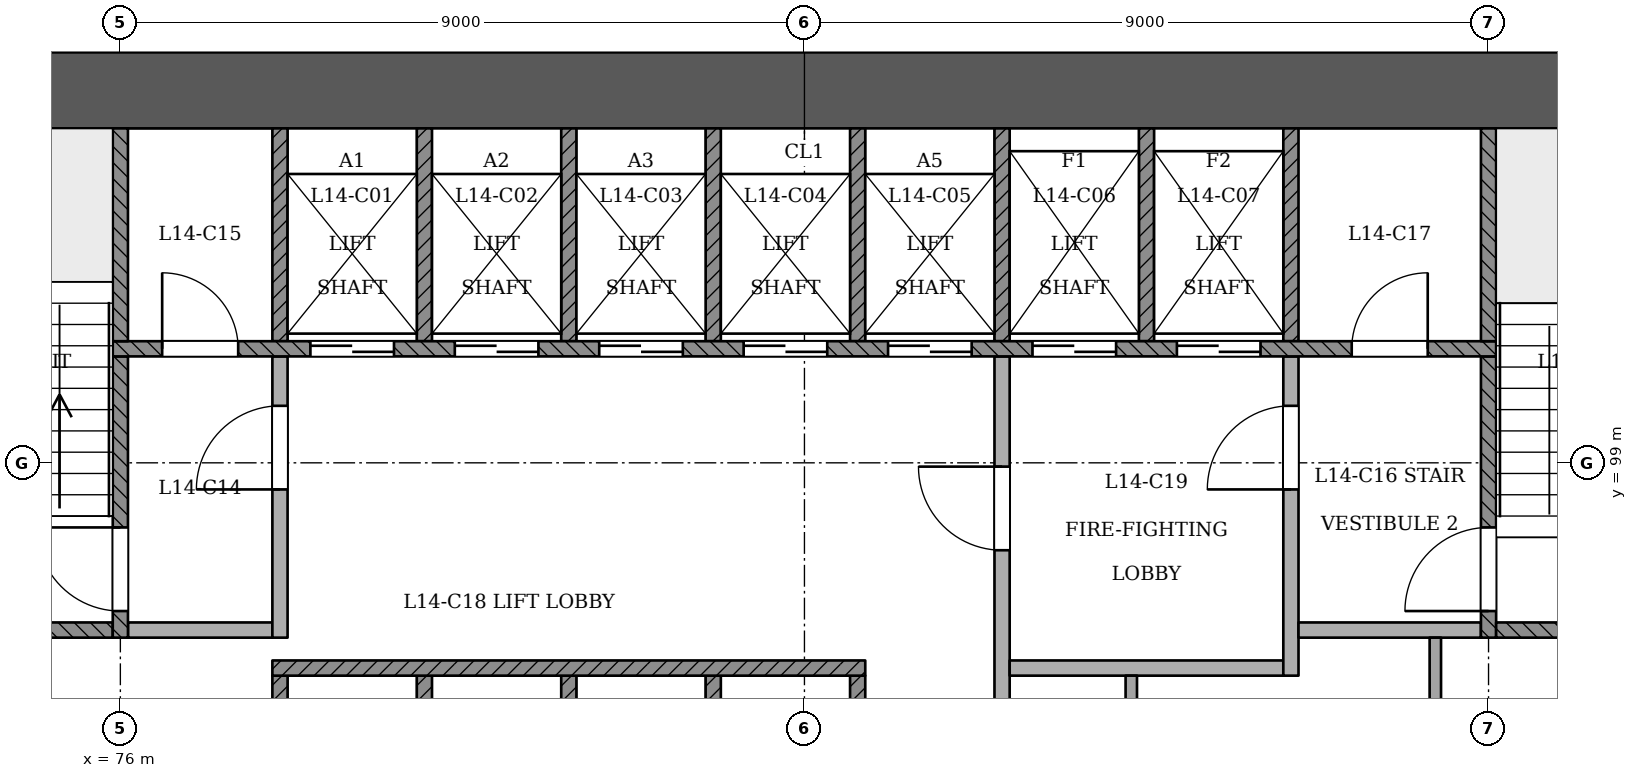
"""IFC4 building model, lengths in metres.
Left out: names, types, materials, properties, quantities, classifications, styles, units other than length and angle.
Written with IfcOpenShell. Run it as: python <this file> out.ifc"""

import sys

from ifc_helpers import new_model, si_unit, direction, frame, frame_2d, origin, place, context, subcontext, project, spatial, rectangle, extrude, element, fill, save


model = new_model("IFC4")
c1 = context("Model", 3, precision=1e-05, world=origin(), true_north=direction((0.0, 1.0)))
c2 = subcontext(c1, "Body", "Model", "MODEL_VIEW")
j1 = project(units=[si_unit("LENGTHUNIT", "METRE"), si_unit("PLANEANGLEUNIT", "RADIAN")], contexts=[c1])
p1 = place(None, origin())
s1 = spatial("IfcSite", under=j1, at=p1, CompositionType="ELEMENT")
p2 = place(p1, origin())
s2 = spatial("IfcBuilding", under=s1, at=p2, CompositionType="ELEMENT")
p3 = place(p2, frame((0.0, 0.0, 59.4)))
s3 = spatial("IfcBuildingStorey", under=s2, at=p3, CompositionType="ELEMENT", Elevation=59.4)
p4 = place(p3, frame((97.5, 103.9, 0.0), z_axis=(0.0, 0.0, 1.0), x_axis=(-1.0, 0.0, 0.0)))
e1 = element("IfcWall", 1, at=p4, inside=s3, PredefinedType="SHEAR", context=c2, shape_type="SweptSolid", body=[
    extrude(rectangle(XDim=25.5, YDim=1.0, at=frame_2d((12.75, 0.0))), origin(), (0.0, 0.0, 1.0), 3.6),
])
p5 = place(p3, frame((62.256, 96.887, 0.0), z_axis=(0.0, 0.0, 1.0), x_axis=(0.500001966348, -0.86602426851, 0.0)))
e2 = element("IfcWall", 2, at=p5, inside=s3, PredefinedType="PARTITIONING", context=c2, shape_type="SweptSolid", body=[
    extrude(rectangle(XDim=43.626, YDim=0.15, at=frame_2d((21.813, 0.0))), origin(), (0.0, 0.0, 1.0), 2.7),
])
p6 = place(p5, frame((3.556, 0.0, 0.0)))
e3 = element("IfcOpeningElement", 3, at=p6, cuts=e2, PredefinedType="OPENING", context=c2, shape_type="SweptSolid", body=[
    extrude(rectangle(XDim=1.2, YDim=2.1, at=frame_2d((0.6, 1.05))), frame((0.0, 0.085, 0.0), z_axis=(0.0, -1.0, 0.0), x_axis=(1.0, 0.0, 0.0)), (0.0, 0.0, 1.0), 0.171),
])
p7 = place(p5, frame((12.213, 0.0, 0.0)))
e4 = element("IfcOpeningElement", 4, at=p7, cuts=e2, PredefinedType="OPENING", context=c2, shape_type="SweptSolid", body=[
    extrude(rectangle(XDim=1.2, YDim=2.1, at=frame_2d((0.6, 1.05))), frame((0.0, 0.085, 0.0), z_axis=(0.0, -1.0, 0.0), x_axis=(1.0, 0.0, 0.0)), (0.0, 0.0, 1.0), 0.171),
])
p8 = place(p5, frame((19.063, 0.0, 0.0)))
e5 = element("IfcOpeningElement", 5, at=p8, cuts=e2, PredefinedType="OPENING", context=c2, shape_type="SweptSolid", body=[
    extrude(rectangle(XDim=1.0, YDim=2.1, at=frame_2d((0.5, 1.05))), frame((0.0, 0.085, 0.0), z_axis=(0.0, -1.0, 0.0), x_axis=(1.0, 0.0, 0.0)), (0.0, 0.0, 1.0), 0.171),
])
p9 = place(p5, frame((27.963, 0.0, 0.0)))
e6 = element("IfcOpeningElement", 6, at=p9, cuts=e2, PredefinedType="OPENING", context=c2, shape_type="SweptSolid", body=[
    extrude(rectangle(XDim=1.2, YDim=2.1, at=frame_2d((0.6, 1.05))), frame((0.0, 0.085, 0.0), z_axis=(0.0, -1.0, 0.0), x_axis=(1.0, 0.0, 0.0)), (0.0, 0.0, 1.0), 0.171),
])
p10 = place(p5, frame((38.869, 0.0, 0.0)))
e7 = element("IfcOpeningElement", 7, at=p10, cuts=e2, PredefinedType="OPENING", context=c2, shape_type="SweptSolid", body=[
    extrude(rectangle(XDim=1.2, YDim=2.1, at=frame_2d((0.6, 1.05))), frame((0.0, 0.085, 0.0), z_axis=(0.0, -1.0, 0.0), x_axis=(1.0, 0.0, 0.0)), (0.0, 0.0, 1.0), 0.171),
])
p11 = place(p3, frame((85.931, 59.106, 0.0), z_axis=(0.0, 0.0, 1.0), x_axis=(0.499999543107, 0.866025667572, 0.0)))
e8 = element("IfcWall", 8, at=p11, inside=s3, PredefinedType="PARTITIONING", context=c2, shape_type="SweptSolid", body=[
    extrude(rectangle(XDim=43.626, YDim=0.15, at=frame_2d((21.813, 0.0))), origin(), (0.0, 0.0, 1.0), 2.7),
])
p12 = place(p11, frame((3.556, 0.0, 0.0)))
e9 = element("IfcOpeningElement", 9, at=p12, cuts=e8, PredefinedType="OPENING", context=c2, shape_type="SweptSolid", body=[
    extrude(rectangle(XDim=1.2, YDim=2.1, at=frame_2d((0.6, 1.05))), frame((0.0, 0.085, 0.0), z_axis=(0.0, -1.0, 0.0), x_axis=(1.0, 0.0, 0.0)), (0.0, 0.0, 1.0), 0.171),
])
p13 = place(p11, frame((14.463, 0.0, 0.0)))
e10 = element("IfcOpeningElement", 10, at=p13, cuts=e8, PredefinedType="OPENING", context=c2, shape_type="SweptSolid", body=[
    extrude(rectangle(XDim=1.2, YDim=2.1, at=frame_2d((0.6, 1.05))), frame((0.0, 0.085, 0.0), z_axis=(0.0, -1.0, 0.0), x_axis=(1.0, 0.0, 0.0)), (0.0, 0.0, 1.0), 0.171),
])
p14 = place(p11, frame((27.963, 0.0, 0.0)))
e11 = element("IfcOpeningElement", 11, at=p14, cuts=e8, PredefinedType="OPENING", context=c2, shape_type="SweptSolid", body=[
    extrude(rectangle(XDim=1.2, YDim=2.1, at=frame_2d((0.6, 1.05))), frame((0.0, 0.085, 0.0), z_axis=(0.0, -1.0, 0.0), x_axis=(1.0, 0.0, 0.0)), (0.0, 0.0, 1.0), 0.171),
])
p15 = place(p11, frame((38.869, 0.0, 0.0)))
e12 = element("IfcOpeningElement", 12, at=p15, cuts=e8, PredefinedType="OPENING", context=c2, shape_type="SweptSolid", body=[
    extrude(rectangle(XDim=1.2, YDim=2.1, at=frame_2d((0.6, 1.05))), frame((0.0, 0.085, 0.0), z_axis=(0.0, -1.0, 0.0), x_axis=(1.0, 0.0, 0.0)), (0.0, 0.0, 1.0), 0.171),
])
for number, where, z_axis, x_axis in (
    (13, (78.1, 93.4, 0.0), (0.0, 0.0, 1.0), (0.0, 1.0, 0.0)),
    (14, (80.0, 93.4, 0.0), (0.0, 0.0, 1.0), (0.0, 1.0, 0.0)),
    (15, (81.9, 93.4, 0.0), (0.0, 0.0, 1.0), (0.0, 1.0, 0.0)),
    (16, (83.8, 93.4, 0.0), (0.0, 0.0, 1.0), (0.0, 1.0, 0.0)),
    (17, (85.7, 93.4, 0.0), (0.0, 0.0, 1.0), (0.0, 1.0, 0.0)),
):
    element("IfcWall", number, at=place(p3, frame(where, z_axis=z_axis, x_axis=x_axis)), inside=s3, PredefinedType="SOLIDWALL", context=c2, shape_type="SweptSolid", body=[
        extrude(rectangle(XDim=2.8, YDim=0.2, at=frame_2d((1.4, 0.0))), origin(), (0.0, 0.0, 1.0), 3.1),
    ])
p16 = place(p3, frame((87.6, 93.4, 0.0), z_axis=(0.0, 0.0, 1.0), x_axis=(0.0, 1.0, 0.0)))
e18 = element("IfcWall", 18, at=p16, inside=s3, PredefinedType="PARTITIONING", context=c2, shape_type="SweptSolid", body=[
    extrude(rectangle(XDim=7.0, YDim=0.2, at=frame_2d((3.5, 0.0))), origin(), (0.0, 0.0, 1.0), 3.1),
])
p17 = place(p16, frame((4.45, 0.0, 0.0)))
e19 = element("IfcOpeningElement", 19, at=p17, cuts=e18, PredefinedType="OPENING", context=c2, shape_type="SweptSolid", body=[
    extrude(rectangle(XDim=1.1, YDim=2.1, at=frame_2d((0.55, 1.05))), frame((0.0, 0.11, 0.0), z_axis=(0.0, -1.0, 0.0), x_axis=(1.0, 0.0, 0.0)), (0.0, 0.0, 1.0), 0.221),
])
p18 = place(p3, frame((89.3, 93.4, 0.0), z_axis=(0.0, 0.0, 1.0), x_axis=(0.0, 1.0, 0.0)))
e20 = element("IfcWall", 20, at=p18, inside=s3, PredefinedType="PARTITIONING", context=c2, shape_type="SweptSolid", body=[
    extrude(rectangle(XDim=2.8, YDim=0.15, at=frame_2d((1.4, 0.0))), origin(), (0.0, 0.0, 1.0), 3.1),
])
p19 = place(p3, frame((93.3, 93.4, 0.0), z_axis=(0.0, 0.0, 1.0), x_axis=(0.0, 1.0, 0.0)))
e21 = element("IfcWall", 21, at=p19, inside=s3, PredefinedType="PARTITIONING", context=c2, shape_type="SweptSolid", body=[
    extrude(rectangle(XDim=3.3, YDim=0.15, at=frame_2d((1.65, 0.0))), origin(), (0.0, 0.0, 1.0), 3.1),
])
p20 = place(p3, frame((78.0, 96.3, 0.0), z_axis=(0.0, 0.0, 1.0), x_axis=(1.0, 0.0, 0.0)))
e22 = element("IfcWall", 22, at=p20, inside=s3, PredefinedType="SOLIDWALL", context=c2, shape_type="SweptSolid", body=[
    extrude(rectangle(XDim=7.8, YDim=0.2, at=frame_2d((3.9, 0.0))), origin(), (0.0, 0.0, 1.0), 3.1),
])
p21 = place(p3, frame((87.7, 96.3, 0.0), z_axis=(0.0, 0.0, 1.0), x_axis=(1.0, 0.0, 0.0)))
e23 = element("IfcWall", 23, at=p21, inside=s3, PredefinedType="PARTITIONING", context=c2, shape_type="SweptSolid", body=[
    extrude(rectangle(XDim=3.6, YDim=0.2, at=frame_2d((1.8, 0.0))), origin(), (0.0, 0.0, 1.0), 3.1),
])
p22 = place(p3, frame((91.4, 96.2, 0.0), z_axis=(0.0, 0.0, 1.0), x_axis=(0.0, 1.0, 0.0)))
e24 = element("IfcWall", 24, at=p22, inside=s3, PredefinedType="PARTITIONING", context=c2, shape_type="SweptSolid", body=[
    extrude(rectangle(XDim=4.2, YDim=0.2, at=frame_2d((2.1, 0.0))), origin(), (0.0, 0.0, 1.0), 3.1),
])
p23 = place(p22, frame((2.45, 0.0, 0.0)))
e25 = element("IfcOpeningElement", 25, at=p23, cuts=e24, PredefinedType="OPENING", context=c2, shape_type="SweptSolid", body=[
    extrude(rectangle(XDim=1.1, YDim=2.1, at=frame_2d((0.55, 1.05))), frame((0.0, 0.11, 0.0), z_axis=(0.0, -1.0, 0.0), x_axis=(1.0, 0.0, 0.0)), (0.0, 0.0, 1.0), 0.221),
])
p24 = place(p3, frame((73.0, 96.8, 0.0), z_axis=(0.0, 0.0, 1.0), x_axis=(1.0, 0.0, 0.0)))
e26 = element("IfcWall", 26, at=p24, inside=s3, PredefinedType="SOLIDWALL", context=c2, shape_type="SweptSolid", body=[
    extrude(rectangle(XDim=2.9, YDim=0.2, at=frame_2d((1.45, 0.0))), origin(), (0.0, 0.0, 1.0), 3.1),
])
p25 = place(p3, frame((76.0, 96.7, 0.0), z_axis=(0.0, 0.0, 1.0), x_axis=(0.0, 1.0, 0.0)))
e27 = element("IfcWall", 27, at=p25, inside=s3, PredefinedType="SOLIDWALL", context=c2, shape_type="SweptSolid", body=[
    extrude(rectangle(XDim=3.7, YDim=0.2, at=frame_2d((1.85, 0.0))), origin(), (0.0, 0.0, 1.0), 3.1),
])
p26 = place(p25, frame((0.35, 0.0, 0.0)))
e28 = element("IfcOpeningElement", 28, at=p26, cuts=e27, PredefinedType="OPENING", context=c2, shape_type="SweptSolid", body=[
    extrude(rectangle(XDim=1.1, YDim=2.1, at=frame_2d((0.55, 1.05))), frame((0.0, 0.11, 0.0), z_axis=(0.0, -1.0, 0.0), x_axis=(1.0, 0.0, 0.0)), (0.0, 0.0, 1.0), 0.221),
])
p27 = place(p3, frame((76.1, 96.8, 0.0), z_axis=(0.0, 0.0, 1.0), x_axis=(1.0, 0.0, 0.0)))
e29 = element("IfcWall", 29, at=p27, inside=s3, PredefinedType="PARTITIONING", context=c2, shape_type="SweptSolid", body=[
    extrude(rectangle(XDim=1.9, YDim=0.2, at=frame_2d((0.95, 0.0))), origin(), (0.0, 0.0, 1.0), 3.1),
])
p28 = place(p3, frame((78.1, 96.7, 0.0), z_axis=(0.0, 0.0, 1.0), x_axis=(0.0, 1.0, 0.0)))
e30 = element("IfcWall", 30, at=p28, inside=s3, PredefinedType="PARTITIONING", context=c2, shape_type="SweptSolid", body=[
    extrude(rectangle(XDim=3.7, YDim=0.2, at=frame_2d((1.85, 0.0))), origin(), (0.0, 0.0, 1.0), 3.1),
])
p29 = place(p28, frame((1.95, 0.0, 0.0)))
e31 = element("IfcOpeningElement", 31, at=p29, cuts=e30, PredefinedType="OPENING", context=c2, shape_type="SweptSolid", body=[
    extrude(rectangle(XDim=1.1, YDim=2.1, at=frame_2d((0.55, 1.05))), frame((0.0, 0.11, 0.0), z_axis=(0.0, -1.0, 0.0), x_axis=(1.0, 0.0, 0.0)), (0.0, 0.0, 1.0), 0.221),
])
p30 = place(p3, frame((91.5, 96.8, 0.0), z_axis=(0.0, 0.0, 1.0), x_axis=(1.0, 0.0, 0.0)))
e32 = element("IfcWall", 32, at=p30, inside=s3, PredefinedType="PARTITIONING", context=c2, shape_type="SweptSolid", body=[
    extrude(rectangle(XDim=2.4, YDim=0.2, at=frame_2d((1.2, 0.0))), origin(), (0.0, 0.0, 1.0), 3.1),
])
p31 = place(p3, frame((94.0, 96.7, 0.0), z_axis=(0.0, 0.0, 1.0), x_axis=(0.0, 1.0, 0.0)))
e33 = element("IfcWall", 33, at=p31, inside=s3, PredefinedType="SOLIDWALL", context=c2, shape_type="SweptSolid", body=[
    extrude(rectangle(XDim=3.7, YDim=0.2, at=frame_2d((1.85, 0.0))), origin(), (0.0, 0.0, 1.0), 3.1),
])
p32 = place(p31, frame((0.35, 0.0, 0.0)))
e34 = element("IfcOpeningElement", 34, at=p32, cuts=e33, PredefinedType="OPENING", context=c2, shape_type="SweptSolid", body=[
    extrude(rectangle(XDim=1.1, YDim=2.1, at=frame_2d((0.55, 1.05))), frame((0.0, 0.11, 0.0), z_axis=(0.0, -1.0, 0.0), x_axis=(1.0, 0.0, 0.0)), (0.0, 0.0, 1.0), 0.221),
])
p33 = place(p3, frame((94.1, 96.8, 0.0), z_axis=(0.0, 0.0, 1.0), x_axis=(1.0, 0.0, 0.0)))
e35 = element("IfcWall", 35, at=p33, inside=s3, PredefinedType="SOLIDWALL", context=c2, shape_type="SweptSolid", body=[
    extrude(rectangle(XDim=2.9, YDim=0.2, at=frame_2d((1.45, 0.0))), origin(), (0.0, 0.0, 1.0), 3.1),
])
p34 = place(p3, frame((75.9, 100.5, 0.0), z_axis=(0.0, 0.0, 1.0), x_axis=(1.0, 0.0, 0.0)))
e36 = element("IfcWall", 36, at=p34, inside=s3, PredefinedType="SOLIDWALL", context=c2, shape_type="SweptSolid", body=[
    extrude(rectangle(XDim=18.2, YDim=0.2, at=frame_2d((9.1, 0.0))), origin(), (0.0, 0.0, 1.0), 3.1),
])
p35 = place(p34, frame((2.6, 0.0, 0.0)))
e37 = element("IfcOpeningElement", 37, at=p35, cuts=e36, PredefinedType="OPENING", context=c2, shape_type="SweptSolid", body=[
    extrude(rectangle(XDim=1.1, YDim=2.1, at=frame_2d((0.55, 1.05))), frame((0.0, 0.11, 0.0), z_axis=(0.0, -1.0, 0.0), x_axis=(1.0, 0.0, 0.0)), (0.0, 0.0, 1.0), 0.221),
])
p36 = place(p34, frame((4.5, 0.0, 0.0)))
e38 = element("IfcOpeningElement", 38, at=p36, cuts=e36, PredefinedType="OPENING", context=c2, shape_type="SweptSolid", body=[
    extrude(rectangle(XDim=1.1, YDim=2.1, at=frame_2d((0.55, 1.05))), frame((0.0, 0.11, 0.0), z_axis=(0.0, -1.0, 0.0), x_axis=(1.0, 0.0, 0.0)), (0.0, 0.0, 1.0), 0.221),
])
p37 = place(p34, frame((6.4, 0.0, 0.0)))
e39 = element("IfcOpeningElement", 39, at=p37, cuts=e36, PredefinedType="OPENING", context=c2, shape_type="SweptSolid", body=[
    extrude(rectangle(XDim=1.1, YDim=2.1, at=frame_2d((0.55, 1.05))), frame((0.0, 0.11, 0.0), z_axis=(0.0, -1.0, 0.0), x_axis=(1.0, 0.0, 0.0)), (0.0, 0.0, 1.0), 0.221),
])
p38 = place(p34, frame((8.3, 0.0, 0.0)))
e40 = element("IfcOpeningElement", 40, at=p38, cuts=e36, PredefinedType="OPENING", context=c2, shape_type="SweptSolid", body=[
    extrude(rectangle(XDim=1.1, YDim=2.1, at=frame_2d((0.55, 1.05))), frame((0.0, 0.11, 0.0), z_axis=(0.0, -1.0, 0.0), x_axis=(1.0, 0.0, 0.0)), (0.0, 0.0, 1.0), 0.221),
])
p39 = place(p34, frame((10.2, 0.0, 0.0)))
e41 = element("IfcOpeningElement", 41, at=p39, cuts=e36, PredefinedType="OPENING", context=c2, shape_type="SweptSolid", body=[
    extrude(rectangle(XDim=1.1, YDim=2.1, at=frame_2d((0.55, 1.05))), frame((0.0, 0.11, 0.0), z_axis=(0.0, -1.0, 0.0), x_axis=(1.0, 0.0, 0.0)), (0.0, 0.0, 1.0), 0.221),
])
p40 = place(p34, frame((12.1, 0.0, 0.0)))
e42 = element("IfcOpeningElement", 42, at=p40, cuts=e36, PredefinedType="OPENING", context=c2, shape_type="SweptSolid", body=[
    extrude(rectangle(XDim=1.1, YDim=2.1, at=frame_2d((0.55, 1.05))), frame((0.0, 0.11, 0.0), z_axis=(0.0, -1.0, 0.0), x_axis=(1.0, 0.0, 0.0)), (0.0, 0.0, 1.0), 0.221),
])
p41 = place(p34, frame((14.0, 0.0, 0.0)))
e43 = element("IfcOpeningElement", 43, at=p41, cuts=e36, PredefinedType="OPENING", context=c2, shape_type="SweptSolid", body=[
    extrude(rectangle(XDim=1.1, YDim=2.1, at=frame_2d((0.55, 1.05))), frame((0.0, 0.11, 0.0), z_axis=(0.0, -1.0, 0.0), x_axis=(1.0, 0.0, 0.0)), (0.0, 0.0, 1.0), 0.221),
])
p42 = place(p34, frame((0.65, 0.0, 0.0)))
e44 = element("IfcOpeningElement", 44, at=p42, cuts=e36, PredefinedType="OPENING", context=c2, shape_type="SweptSolid", body=[
    extrude(rectangle(XDim=1.0, YDim=2.1, at=frame_2d((0.5, 1.05))), frame((0.0, 0.11, 0.0), z_axis=(0.0, -1.0, 0.0), x_axis=(1.0, 0.0, 0.0)), (0.0, 0.0, 1.0), 0.221),
])
p43 = place(p34, frame((16.3, 0.0, 0.0)))
e45 = element("IfcOpeningElement", 45, at=p43, cuts=e36, PredefinedType="OPENING", context=c2, shape_type="SweptSolid", body=[
    extrude(rectangle(XDim=1.0, YDim=2.1, at=frame_2d((0.5, 1.05))), frame((0.0, 0.11, 0.0), z_axis=(0.0, -1.0, 0.0), x_axis=(1.0, 0.0, 0.0)), (0.0, 0.0, 1.0), 0.221),
])
for number, where, z_axis, x_axis in (
    (46, (76.0, 100.6, 0.0), (0.0, 0.0, 1.0), (0.0, 1.0, 0.0)),
    (47, (78.1, 100.6, 0.0), (0.0, 0.0, 1.0), (0.0, 1.0, 0.0)),
    (48, (80.0, 100.6, 0.0), (0.0, 0.0, 1.0), (0.0, 1.0, 0.0)),
    (49, (81.9, 100.6, 0.0), (0.0, 0.0, 1.0), (0.0, 1.0, 0.0)),
    (50, (83.8, 100.6, 0.0), (0.0, 0.0, 1.0), (0.0, 1.0, 0.0)),
    (51, (85.7, 100.6, 0.0), (0.0, 0.0, 1.0), (0.0, 1.0, 0.0)),
    (52, (87.6, 100.6, 0.0), (0.0, 0.0, 1.0), (0.0, 1.0, 0.0)),
    (53, (89.5, 100.6, 0.0), (0.0, 0.0, 1.0), (0.0, 1.0, 0.0)),
    (54, (91.4, 100.6, 0.0), (0.0, 0.0, 1.0), (0.0, 1.0, 0.0)),
    (55, (94.0, 100.6, 0.0), (0.0, 0.0, 1.0), (0.0, 1.0, 0.0)),
):
    element("IfcWall", number, at=place(p3, frame(where, z_axis=z_axis, x_axis=x_axis)), inside=s3, PredefinedType="SOLIDWALL", context=c2, shape_type="SweptSolid", body=[
        extrude(rectangle(XDim=2.8, YDim=0.2, at=frame_2d((1.4, 0.0))), origin(), (0.0, 0.0, 1.0), 3.1),
    ])
p44 = place(p35, origin())
e56 = element("IfcDoor", 56, at=p44, inside=s3, OperationType="SLIDING_TO_RIGHT", PredefinedType="NOTDEFINED", context=c2, shape_type="SweptSolid", body=[
    extrude(rectangle(XDim=1.1, YDim=2.1, at=frame_2d((0.55, 1.05))), frame((0.0, 0.025, 0.0), z_axis=(0.0, -1.0, 0.0), x_axis=(1.0, 0.0, 0.0)), (0.0, 0.0, 1.0), 0.05),
])
fill(e37, e56)
p45 = place(p36, origin())
e57 = element("IfcDoor", 57, at=p45, inside=s3, OperationType="SLIDING_TO_LEFT", PredefinedType="NOTDEFINED", context=c2, shape_type="SweptSolid", body=[
    extrude(rectangle(XDim=1.1, YDim=2.1, at=frame_2d((0.55, 1.05))), frame((0.0, 0.025, 0.0), z_axis=(0.0, -1.0, 0.0), x_axis=(1.0, 0.0, 0.0)), (0.0, 0.0, 1.0), 0.05),
])
fill(e38, e57)
p46 = place(p37, origin())
e58 = element("IfcDoor", 58, at=p46, inside=s3, OperationType="SLIDING_TO_RIGHT", PredefinedType="NOTDEFINED", context=c2, shape_type="SweptSolid", body=[
    extrude(rectangle(XDim=1.1, YDim=2.1, at=frame_2d((0.55, 1.05))), frame((0.0, 0.025, 0.0), z_axis=(0.0, -1.0, 0.0), x_axis=(1.0, 0.0, 0.0)), (0.0, 0.0, 1.0), 0.05),
])
fill(e39, e58)
p47 = place(p38, origin())
e59 = element("IfcDoor", 59, at=p47, inside=s3, OperationType="SLIDING_TO_LEFT", PredefinedType="NOTDEFINED", context=c2, shape_type="SweptSolid", body=[
    extrude(rectangle(XDim=1.1, YDim=2.1, at=frame_2d((0.55, 1.05))), frame((0.0, 0.025, 0.0), z_axis=(0.0, -1.0, 0.0), x_axis=(1.0, 0.0, 0.0)), (0.0, 0.0, 1.0), 0.05),
])
fill(e40, e59)
p48 = place(p39, origin())
e60 = element("IfcDoor", 60, at=p48, inside=s3, OperationType="SLIDING_TO_RIGHT", PredefinedType="NOTDEFINED", context=c2, shape_type="SweptSolid", body=[
    extrude(rectangle(XDim=1.1, YDim=2.1, at=frame_2d((0.55, 1.05))), frame((0.0, 0.025, 0.0), z_axis=(0.0, -1.0, 0.0), x_axis=(1.0, 0.0, 0.0)), (0.0, 0.0, 1.0), 0.05),
])
fill(e41, e60)
p49 = place(p40, origin())
e61 = element("IfcDoor", 61, at=p49, inside=s3, OperationType="SLIDING_TO_RIGHT", PredefinedType="NOTDEFINED", context=c2, shape_type="SweptSolid", body=[
    extrude(rectangle(XDim=1.1, YDim=2.1, at=frame_2d((0.55, 1.05))), frame((0.0, 0.025, 0.0), z_axis=(0.0, -1.0, 0.0), x_axis=(1.0, 0.0, 0.0)), (0.0, 0.0, 1.0), 0.05),
])
fill(e42, e61)
p50 = place(p41, origin())
e62 = element("IfcDoor", 62, at=p50, inside=s3, OperationType="SLIDING_TO_LEFT", PredefinedType="NOTDEFINED", context=c2, shape_type="SweptSolid", body=[
    extrude(rectangle(XDim=1.1, YDim=2.1, at=frame_2d((0.55, 1.05))), frame((0.0, 0.025, 0.0), z_axis=(0.0, -1.0, 0.0), x_axis=(1.0, 0.0, 0.0)), (0.0, 0.0, 1.0), 0.05),
])
fill(e43, e62)
p51 = place(p26, origin())
e63 = element("IfcDoor", 63, at=p51, inside=s3, OperationType="SINGLE_SWING_RIGHT", PredefinedType="NOTDEFINED", context=c2, shape_type="SweptSolid", body=[
    extrude(rectangle(XDim=1.1, YDim=2.1, at=frame_2d((0.55, 1.05))), frame((0.0, 0.025, 0.0), z_axis=(0.0, -1.0, 0.0), x_axis=(1.0, 0.0, 0.0)), (0.0, 0.0, 1.0), 0.05),
])
fill(e28, e63)
p52 = place(p32, origin())
e64 = element("IfcDoor", 64, at=p52, inside=s3, OperationType="SINGLE_SWING_LEFT", PredefinedType="NOTDEFINED", context=c2, shape_type="SweptSolid", body=[
    extrude(rectangle(XDim=1.1, YDim=2.1, at=frame_2d((0.55, 1.05))), frame((0.0, 0.025, 0.0), z_axis=(0.0, -1.0, 0.0), x_axis=(1.0, 0.0, 0.0)), (0.0, 0.0, 1.0), 0.05),
])
fill(e34, e64)
p53 = place(p29, origin())
e65 = element("IfcDoor", 65, at=p53, inside=s3, OperationType="SINGLE_SWING_LEFT", PredefinedType="NOTDEFINED", context=c2, shape_type="SweptSolid", body=[
    extrude(rectangle(XDim=1.1, YDim=2.1, at=frame_2d((0.55, 1.05))), frame((0.0, 0.025, 0.0), z_axis=(0.0, -1.0, 0.0), x_axis=(1.0, 0.0, 0.0)), (0.0, 0.0, 1.0), 0.05),
])
fill(e31, e65)
p54 = place(p17, origin())
e66 = element("IfcDoor", 66, at=p54, inside=s3, OperationType="SINGLE_SWING_RIGHT", PredefinedType="NOTDEFINED", context=c2, shape_type="SweptSolid", body=[
    extrude(rectangle(XDim=1.1, YDim=2.1, at=frame_2d((0.55, 1.05))), frame((0.0, 0.025, 0.0), z_axis=(0.0, -1.0, 0.0), x_axis=(1.0, 0.0, 0.0)), (0.0, 0.0, 1.0), 0.05),
])
fill(e19, e66)
p55 = place(p23, origin())
e67 = element("IfcDoor", 67, at=p55, inside=s3, OperationType="SINGLE_SWING_LEFT", PredefinedType="NOTDEFINED", context=c2, shape_type="SweptSolid", body=[
    extrude(rectangle(XDim=1.1, YDim=2.1, at=frame_2d((0.55, 1.05))), frame((0.0, 0.025, 0.0), z_axis=(0.0, -1.0, 0.0), x_axis=(1.0, 0.0, 0.0)), (0.0, 0.0, 1.0), 0.05),
])
fill(e25, e67)
p56 = place(p42, origin())
e68 = element("IfcDoor", 68, at=p56, inside=s3, OperationType="SINGLE_SWING_LEFT", PredefinedType="NOTDEFINED", context=c2, shape_type="SweptSolid", body=[
    extrude(rectangle(XDim=1.0, YDim=2.1, at=frame_2d((0.5, 1.05))), frame((0.0, 0.025, 0.0), z_axis=(0.0, -1.0, 0.0), x_axis=(1.0, 0.0, 0.0)), (0.0, 0.0, 1.0), 0.05),
])
fill(e44, e68)
p57 = place(p43, origin())
e69 = element("IfcDoor", 69, at=p57, inside=s3, OperationType="SINGLE_SWING_RIGHT", PredefinedType="NOTDEFINED", context=c2, shape_type="SweptSolid", body=[
    extrude(rectangle(XDim=1.0, YDim=2.1, at=frame_2d((0.5, 1.05))), frame((0.0, 0.025, 0.0), z_axis=(0.0, -1.0, 0.0), x_axis=(1.0, 0.0, 0.0)), (0.0, 0.0, 1.0), 0.05),
])
fill(e45, e69)
save(model, sys.argv[1])
